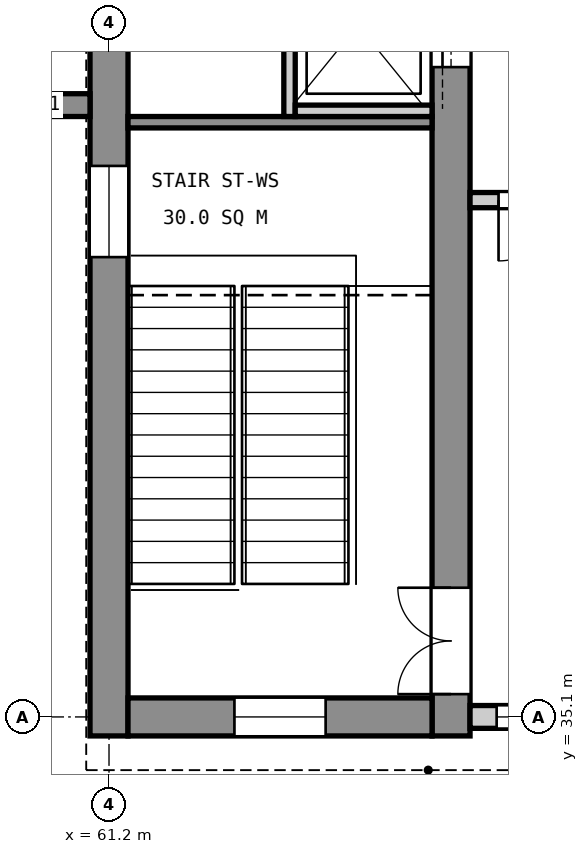
"""IFC4 building model, lengths in metres.
Left out: names, types, materials, properties, quantities, classifications, styles, units other than length and angle.
Written with IfcOpenShell. Run it as: python <this file> out.ifc"""

import sys

from ifc_helpers import new_model, si_unit, direction, frame, frame_2d, origin, place, context, subcontext, project, spatial, rectangle, extrude, element, fill, save


model = new_model("IFC4")
c1 = context("Model", 3, precision=1e-05, world=origin(), true_north=direction((0.0, 1.0)))
c2 = subcontext(c1, "Body", "Model", "MODEL_VIEW")
j1 = project(units=[si_unit("LENGTHUNIT", "METRE"), si_unit("PLANEANGLEUNIT", "RADIAN")], contexts=[c1])
p1 = place(None, origin())
s1 = spatial("IfcSite", under=j1, at=p1, CompositionType="ELEMENT")
p2 = place(p1, origin())
s2 = spatial("IfcBuilding", under=s1, at=p2, CompositionType="ELEMENT")
p3 = place(p2, frame((0.0, 0.0, 16.8)))
s3 = spatial("IfcBuildingStorey", under=s2, at=p3, CompositionType="ELEMENT", Elevation=16.8)
p4 = place(p3, frame((61.2, 34.85, 0.0), z_axis=(0.0, 0.0, 1.0), x_axis=(0.0, 1.0, 0.0)))
e1 = element("IfcWall", 1, at=p4, inside=s3, PredefinedType="SHEAR", context=c2, shape_type="SweptSolid", body=[
    extrude(rectangle(XDim=11.3, YDim=0.5, at=frame_2d((5.65, 0.0))), origin(), (0.0, 0.0, 1.0), 5.15),
])
p5 = place(p4, frame((6.3, 0.0, 3.4)))
e2 = element("IfcOpeningElement", 2, at=p5, cuts=e1, PredefinedType="OPENING", context=c2, shape_type="SweptSolid", body=[
    extrude(rectangle(XDim=1.2, YDim=0.9, at=frame_2d((0.6, 0.45))), frame((0.0, 0.26, 0.0), z_axis=(0.0, -1.0, 0.0), x_axis=(1.0, 0.0, 0.0)), (0.0, 0.0, 1.0), 0.52),
])
p6 = place(p3, frame((65.7, 34.85, 0.0), z_axis=(0.0, 0.0, 1.0), x_axis=(0.0, 1.0, 0.0)))
e3 = element("IfcWall", 3, at=p6, inside=s3, PredefinedType="SHEAR", context=c2, shape_type="SweptSolid", body=[
    extrude(rectangle(XDim=11.3, YDim=0.5, at=frame_2d((5.65, 0.0))), origin(), (0.0, 0.0, 1.0), 5.15),
])
p7 = place(p6, frame((0.55, 0.0, 0.0)))
e4 = element("IfcOpeningElement", 4, at=p7, cuts=e3, PredefinedType="OPENING", context=c2, shape_type="SweptSolid", body=[
    extrude(rectangle(XDim=1.4, YDim=2.1, at=frame_2d((0.7, 1.05))), frame((0.0, 0.26, 0.0), z_axis=(0.0, -1.0, 0.0), x_axis=(1.0, 0.0, 0.0)), (0.0, 0.0, 1.0), 0.52),
])
p8 = place(p6, frame((8.8, 0.0, 0.0)))
e5 = element("IfcOpeningElement", 5, at=p8, cuts=e3, PredefinedType="OPENING", context=c2, shape_type="SweptSolid", body=[
    extrude(rectangle(XDim=1.1, YDim=2.1, at=frame_2d((0.55, 1.05))), frame((0.0, 0.26, 0.0), z_axis=(0.0, -1.0, 0.0), x_axis=(1.0, 0.0, 0.0)), (0.0, 0.0, 1.0), 0.52),
])
p9 = place(p3, frame((61.45, 35.1, 0.0), z_axis=(0.0, 0.0, 1.0), x_axis=(1.0, 0.0, 0.0)))
e6 = element("IfcWall", 6, at=p9, inside=s3, PredefinedType="SHEAR", context=c2, shape_type="SweptSolid", body=[
    extrude(rectangle(XDim=4.0, YDim=0.5, at=frame_2d((2.0, 0.0))), origin(), (0.0, 0.0, 1.0), 5.15),
])
p10 = place(p9, frame((1.4, 0.0, 3.4)))
e7 = element("IfcOpeningElement", 7, at=p10, cuts=e6, PredefinedType="OPENING", context=c2, shape_type="SweptSolid", body=[
    extrude(rectangle(XDim=1.2, YDim=0.9, at=frame_2d((0.6, 0.45))), frame((0.0, 0.26, 0.0), z_axis=(0.0, -1.0, 0.0), x_axis=(1.0, 0.0, 0.0)), (0.0, 0.0, 1.0), 0.52),
])
p11 = place(p3, frame((60.95, 43.15, 0.0), z_axis=(0.0, 0.0, 1.0), x_axis=(-1.0, 0.0, 0.0)))
e8 = element("IfcWall", 8, at=p11, inside=s3, PredefinedType="SHEAR", context=c2, shape_type="SweptSolid", body=[
    extrude(rectangle(XDim=1.25, YDim=0.3, at=frame_2d((0.625, 0.0))), origin(), (0.0, 0.0, 1.0), 5.4),
])
p12 = place(p3, frame((61.45, 42.925, 0.0), z_axis=(0.0, 0.0, 1.0), x_axis=(1.0, 0.0, 0.0)))
e9 = element("IfcWall", 9, at=p12, inside=s3, PredefinedType="SOLIDWALL", context=c2, shape_type="SweptSolid", body=[
    extrude(rectangle(XDim=4.0, YDim=0.15, at=frame_2d((2.0, 0.0))), origin(), (0.0, 0.0, 1.0), 5.15),
])
p13 = place(p3, frame((63.575, 43.0, 0.0), z_axis=(0.0, 0.0, 1.0), x_axis=(0.0, 1.0, 0.0)))
e10 = element("IfcWall", 10, at=p13, inside=s3, PredefinedType="SOLIDWALL", context=c2, shape_type="SweptSolid", body=[
    extrude(rectangle(XDim=2.65, YDim=0.15, at=frame_2d((1.325, 0.0))), origin(), (0.0, 0.0, 1.0), 5.4),
])
p14 = place(p3, frame((63.65, 43.075, 0.0), z_axis=(0.0, 0.0, 1.0), x_axis=(1.0, 0.0, 0.0)))
e11 = element("IfcWall", 11, at=p14, inside=s3, PredefinedType="SOLIDWALL", context=c2, shape_type="SweptSolid", body=[
    extrude(rectangle(XDim=1.8, YDim=0.15, at=frame_2d((0.9, 0.0))), origin(), (0.0, 0.0, 1.0), 5.4),
])
p15 = place(p3, frame((65.95, 35.1, 0.0), z_axis=(0.0, 0.0, 1.0), x_axis=(1.0, 0.0, 0.0)))
e12 = element("IfcWall", 12, at=p15, inside=s3, PredefinedType="STANDARD", context=c2, shape_type="SweptSolid", body=[
    extrude(rectangle(XDim=1.9, YDim=0.3, at=frame_2d((0.95, 0.0))), origin(), (0.0, 0.0, 1.0), 4.45),
])
p16 = place(p15, frame((0.35, 0.0, 0.9)))
e13 = element("IfcOpeningElement", 13, at=p16, cuts=e12, PredefinedType="OPENING", context=c2, shape_type="SweptSolid", body=[
    extrude(rectangle(XDim=1.2, YDim=2.4, at=frame_2d((0.6, 1.2))), frame((0.0, 0.16, 0.0), z_axis=(0.0, -1.0, 0.0), x_axis=(1.0, 0.0, 0.0)), (0.0, 0.0, 1.0), 0.32),
])
p17 = place(p3, frame((65.95, 41.9, 0.0), z_axis=(0.0, 0.0, 1.0), x_axis=(1.0, 0.0, 0.0)))
e14 = element("IfcWall", 14, at=p17, inside=s3, PredefinedType="PARTITIONING", context=c2, shape_type="SweptSolid", body=[
    extrude(rectangle(XDim=2.35, YDim=0.2, at=frame_2d((1.175, 0.0))), origin(), (0.0, 0.0, 1.0), 4.05),
])
p18 = place(p17, frame((0.375, 0.0, 0.0)))
e15 = element("IfcOpeningElement", 15, at=p18, cuts=e14, PredefinedType="OPENING", context=c2, shape_type="SweptSolid", body=[
    extrude(rectangle(XDim=1.6, YDim=2.1, at=frame_2d((0.8, 1.05))), frame((0.0, 0.11, 0.0), z_axis=(0.0, -1.0, 0.0), x_axis=(1.0, 0.0, 0.0)), (0.0, 0.0, 1.0), 0.22),
])
p19 = place(p7, origin())
e16 = element("IfcDoor", 16, at=p19, inside=s3, OperationType="DOUBLE_DOOR_SINGLE_SWING", PredefinedType="DOOR", context=c2, shape_type="SweptSolid", body=[
    extrude(rectangle(XDim=1.4, YDim=2.1, at=frame_2d((0.7, 1.05))), frame((0.0, 0.025, 0.0), z_axis=(0.0, -1.0, 0.0), x_axis=(1.0, 0.0, 0.0)), (0.0, 0.0, 1.0), 0.05),
])
fill(e4, e16)
p20 = place(p8, origin())
e17 = element("IfcDoor", 17, at=p20, inside=s3, OperationType="SLIDING_TO_LEFT", PredefinedType="DOOR", context=c2, shape_type="SweptSolid", body=[
    extrude(rectangle(XDim=1.1, YDim=2.1, at=frame_2d((0.55, 1.05))), frame((0.0, 0.025, 0.0), z_axis=(0.0, -1.0, 0.0), x_axis=(1.0, 0.0, 0.0)), (0.0, 0.0, 1.0), 0.05),
])
fill(e5, e17)
p21 = place(p16, origin())
e18 = element("IfcWindow", 18, at=p21, inside=s3, PartitioningType="SINGLE_PANEL", PredefinedType="WINDOW", context=c2, shape_type="SweptSolid", body=[
    extrude(rectangle(XDim=1.2, YDim=2.4, at=frame_2d((0.6, 1.2))), frame((0.0, 0.03, 0.0), z_axis=(0.0, -1.0, 0.0), x_axis=(1.0, 0.0, 0.0)), (0.0, 0.0, 1.0), 0.06),
])
fill(e13, e18)
p22 = place(p5, origin())
e19 = element("IfcWindow", 19, at=p22, inside=s3, PartitioningType="SINGLE_PANEL", PredefinedType="WINDOW", context=c2, shape_type="SweptSolid", body=[
    extrude(rectangle(XDim=1.2, YDim=0.9, at=frame_2d((0.6, 0.45))), frame((0.0, 0.03, 0.0), z_axis=(0.0, -1.0, 0.0), x_axis=(1.0, 0.0, 0.0)), (0.0, 0.0, 1.0), 0.06),
])
fill(e2, e19)
p23 = place(p10, origin())
e20 = element("IfcWindow", 20, at=p23, inside=s3, PartitioningType="SINGLE_PANEL", PredefinedType="WINDOW", context=c2, shape_type="SweptSolid", body=[
    extrude(rectangle(XDim=1.2, YDim=0.9, at=frame_2d((0.6, 0.45))), frame((0.0, 0.03, 0.0), z_axis=(0.0, -1.0, 0.0), x_axis=(1.0, 0.0, 0.0)), (0.0, 0.0, 1.0), 0.06),
])
fill(e7, e20)
p24 = place(p18, frame((1.6, 0.0, 0.0), z_axis=(0.0, 0.0, 1.0), x_axis=(-1.0, 0.0, 0.0)))
e21 = element("IfcDoor", 21, at=p24, inside=s3, OperationType="DOUBLE_DOOR_SINGLE_SWING", PredefinedType="DOOR", context=c2, shape_type="SweptSolid", body=[
    extrude(rectangle(XDim=1.6, YDim=2.1, at=frame_2d((0.8, 1.05))), frame((0.0, 0.025, 0.0), z_axis=(0.0, -1.0, 0.0), x_axis=(1.0, 0.0, 0.0)), (0.0, 0.0, 1.0), 0.05),
])
fill(e15, e21)
save(model, sys.argv[1])
